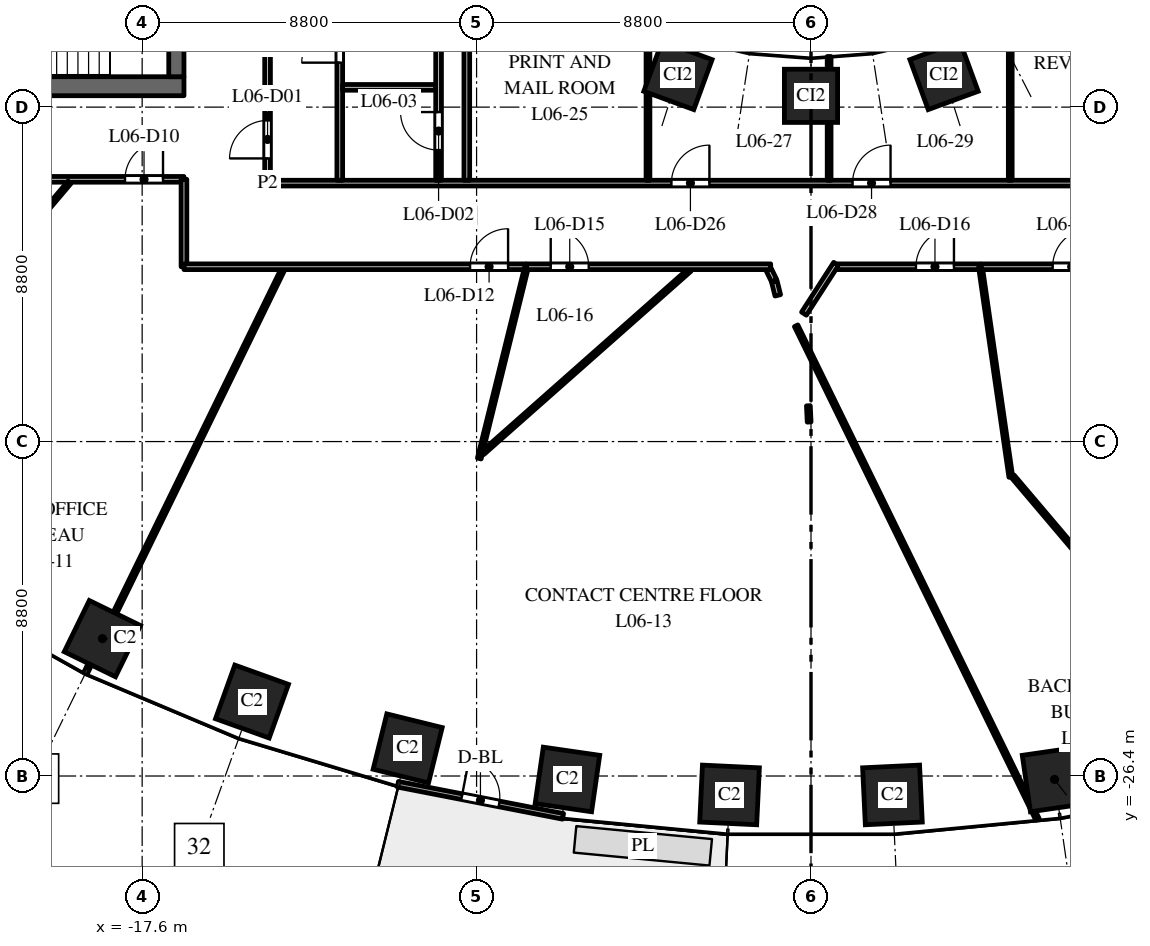
"""IFC4 building model, lengths in metres.
Left out: names, types, materials, properties, quantities, classifications, styles, units other than length and angle.
Written with IfcOpenShell. Run it as: python <this file> out.ifc"""

import sys

from ifc_helpers import new_model, si_unit, direction, frame, frame_2d, origin, origin_2d, place, context, subcontext, project, spatial, rectangle, extrude, element, fill, save


model = new_model("IFC4")
c1 = context("Model", 3, precision=1e-05, world=origin(), true_north=direction((0.0, 1.0)))
c2 = subcontext(c1, "Body", "Model", "MODEL_VIEW")
j1 = project(units=[si_unit("LENGTHUNIT", "METRE"), si_unit("PLANEANGLEUNIT", "RADIAN")], contexts=[c1])
p1 = place(None, origin())
s1 = spatial("IfcSite", under=j1, at=p1, CompositionType="ELEMENT")
p2 = place(p1, origin())
s2 = spatial("IfcBuilding", under=s1, at=p2, CompositionType="ELEMENT")
p3 = place(p2, frame((0.0, 0.0, 34.5)))
s3 = spatial("IfcBuildingStorey", under=s2, at=p3, CompositionType="ELEMENT", Elevation=34.5)
for number, where, z_axis, x_axis in (
    (1, (-18.646, -22.785, 0.0), (0.0, 0.0, 1.0), (0.898, -0.439, 0.0)),
    (2, (-14.709, -24.441, 0.0), (0.0, 0.0, 1.0), (0.941, -0.338, 0.0)),
    (3, (-10.613, -25.674, 0.0), (0.0, 0.0, 1.0), (0.971, -0.24, 0.0)),
    (4, (-6.409, -26.491, 0.0), (0.0, 0.0, 1.0), (0.99, -0.143, 0.0)),
    (5, (-2.143, -26.898, 0.0), (0.0, 0.0, 1.0), (0.999, -0.048, 0.0)),
    (6, (2.143, -26.898, 0.0), (0.0, 0.0, 1.0), (0.999, 0.048, 0.0)),
    (7, (6.409, -26.491, 0.0), (0.0, 0.0, 1.0), (0.99, 0.143, 0.0)),
):
    element("IfcColumn", number, at=place(p3, frame(where, z_axis=z_axis, x_axis=x_axis)), inside=s3, PredefinedType="COLUMN", context=c2, shape_type="SweptSolid", body=[
        extrude(rectangle(XDim=1.5, YDim=1.5, at=origin_2d()), origin(), (0.0, 0.0, 1.0), 4.0),
    ])
for number, where, z_axis, x_axis in (
    (8, (-3.501, -7.967, 0.0), (0.0, 0.0, 1.0), (0.939, -0.344, 0.0)),
    (9, (0.0, -8.503, 0.0), (0.0, 0.0, 1.0), (1.0, 0.0, 0.0)),
    (10, (3.501, -7.967, 0.0), (0.0, 0.0, 1.0), (0.939, 0.344, 0.0)),
):
    element("IfcColumn", number, at=place(p3, frame(where, z_axis=z_axis, x_axis=x_axis)), inside=s3, PredefinedType="COLUMN", context=c2, shape_type="SweptSolid", body=[
        extrude(rectangle(XDim=1.4, YDim=1.4, at=origin_2d()), origin(), (0.0, 0.0, 1.0), 4.0),
    ])
p4 = place(p3, frame((-16.5, -8.25, 0.0), z_axis=(0.0, 0.0, 1.0), x_axis=(-1.0, 0.0, 0.0)))
e11 = element("IfcWall", 11, at=p4, inside=s3, PredefinedType="SHEAR", context=c2, shape_type="SweptSolid", body=[
    extrude(rectangle(XDim=15.0, YDim=0.5, at=frame_2d((7.5, 0.0))), origin(), (0.0, 0.0, 1.0), 3.7),
])
p5 = place(p4, frame((6.9, 0.0, 0.0)))
e12 = element("IfcOpeningElement", 12, at=p5, cuts=e11, PredefinedType="OPENING", context=c2, shape_type="SweptSolid", body=[
    extrude(rectangle(XDim=1.2, YDim=2.1, at=frame_2d((0.6, 1.05))), frame((0.0, 0.26, 0.0), z_axis=(0.0, -1.0, 0.0), x_axis=(1.0, 0.0, 0.0)), (0.0, 0.0, 1.0), 0.52),
])
p6 = place(p4, frame((12.275, 0.0, 0.0)))
e13 = element("IfcOpeningElement", 13, at=p6, cuts=e11, PredefinedType="OPENING", context=c2, shape_type="SweptSolid", body=[
    extrude(rectangle(XDim=0.9, YDim=2.1, at=frame_2d((0.45, 1.05))), frame((0.0, 0.26, 0.0), z_axis=(0.0, -1.0, 0.0), x_axis=(1.0, 0.0, 0.0)), (0.0, 0.0, 1.0), 0.52),
])
p7 = place(p3, frame((-16.7, -8.0, 0.0), z_axis=(0.0, 0.0, 1.0), x_axis=(0.0, 1.0, 0.0)))
e14 = element("IfcWall", 14, at=p7, inside=s3, PredefinedType="SHEAR", context=c2, shape_type="SweptSolid", body=[
    extrude(rectangle(XDim=16.0, YDim=0.4, at=frame_2d((8.0, 0.0))), origin(), (0.0, 0.0, 1.0), 3.7),
])
p8 = place(p3, frame((-10.871, -26.617, 0.0), z_axis=(0.0, 0.0, 1.0), x_axis=(0.981631174778, -0.190788460615, 0.0)))
e15 = element("IfcWall", 15, at=p8, inside=s3, PredefinedType="STANDARD", context=c2, shape_type="SweptSolid", body=[
    extrude(rectangle(XDim=4.426, YDim=0.15, at=frame_2d((2.213, 0.0))), origin(), (0.0, 0.0, 1.0), 3.7),
])
p9 = place(p8, frame((1.713, 0.0, 0.0)))
e16 = element("IfcOpeningElement", 16, at=p9, cuts=e15, PredefinedType="OPENING", context=c2, shape_type="SweptSolid", body=[
    extrude(rectangle(XDim=1.0, YDim=2.4, at=frame_2d((0.5, 1.2))), frame((0.0, 0.085, 0.0), z_axis=(0.0, -1.0, 0.0), x_axis=(1.0, 0.0, 0.0)), (0.0, 0.0, 1.0), 0.17),
])
p10 = place(p3, frame((-31.5, -10.7, 0.0), z_axis=(0.0, 0.0, 1.0), x_axis=(1.0, 0.0, 0.0)))
e17 = element("IfcWall", 17, at=p10, inside=s3, PredefinedType="PARTITIONING", context=c2, shape_type="SweptSolid", body=[
    extrude(rectangle(XDim=15.0, YDim=0.15, at=frame_2d((7.5, 0.0))), origin(), (0.0, 0.0, 1.0), 3.1),
])
p11 = place(p10, frame((9.879, 0.0, 0.0)))
e18 = element("IfcOpeningElement", 18, at=p11, cuts=e17, PredefinedType="OPENING", context=c2, shape_type="SweptSolid", body=[
    extrude(rectangle(XDim=1.0, YDim=2.1, at=frame_2d((0.5, 1.05))), frame((0.0, 0.085, 0.0), z_axis=(0.0, -1.0, 0.0), x_axis=(1.0, 0.0, 0.0)), (0.0, 0.0, 1.0), 0.17),
])
p12 = place(p10, frame((13.449, 0.0, 0.0)))
e19 = element("IfcOpeningElement", 19, at=p12, cuts=e17, PredefinedType="OPENING", context=c2, shape_type="SweptSolid", body=[
    extrude(rectangle(XDim=1.0, YDim=2.1, at=frame_2d((0.5, 1.05))), frame((0.0, 0.085, 0.0), z_axis=(0.0, -1.0, 0.0), x_axis=(1.0, 0.0, 0.0)), (0.0, 0.0, 1.0), 0.17),
])
p13 = place(p3, frame((-26.43, -18.945, 0.0), z_axis=(0.0, 0.0, 1.0), x_axis=(0.646400187952, 0.762998556365, 0.0)))
e20 = element("IfcWall", 20, at=p13, inside=s3, PredefinedType="PARTITIONING", context=c2, shape_type="SweptSolid", body=[
    extrude(rectangle(XDim=10.704, YDim=0.1, at=frame_2d((5.352, 0.0))), origin(), (0.0, 0.0, 1.0), 3.7),
])
p14 = place(p3, frame((-19.086, -23.685, 0.0), z_axis=(0.0, 0.0, 1.0), x_axis=(0.439199750603, 0.898389436197, 0.0)))
e21 = element("IfcWall", 21, at=p14, inside=s3, PredefinedType="PARTITIONING", context=c2, shape_type="SweptSolid", body=[
    extrude(rectangle(XDim=11.81, YDim=0.1, at=frame_2d((5.905, 0.0))), origin(), (0.0, 0.0, 1.0), 3.7),
])
p15 = place(p3, frame((-16.5, -13.0, 0.0), z_axis=(0.0, 0.0, 1.0), x_axis=(0.0, 1.0, 0.0)))
e22 = element("IfcWall", 22, at=p15, inside=s3, PredefinedType="PARTITIONING", context=c2, shape_type="SweptSolid", body=[
    extrude(rectangle(XDim=2.3, YDim=0.15, at=frame_2d((1.15, 0.0))), origin(), (0.0, 0.0, 1.0), 2.75),
])
p16 = place(p3, frame((-16.5, -13.0, 0.0), z_axis=(0.0, 0.0, 1.0), x_axis=(1.0, 0.0, 0.0)))
e23 = element("IfcWall", 23, at=p16, inside=s3, PredefinedType="PARTITIONING", context=c2, shape_type="SweptSolid", body=[
    extrude(rectangle(XDim=9.001, YDim=0.15, at=frame_2d((4.5, 0.0))), origin(), (0.0, 0.0, 1.0), 2.85),
])
p17 = place(p16, frame((7.529, 0.0, 0.0)))
e24 = element("IfcOpeningElement", 24, at=p17, cuts=e23, PredefinedType="OPENING", context=c2, shape_type="SweptSolid", body=[
    extrude(rectangle(XDim=1.0, YDim=2.1, at=frame_2d((0.5, 1.05))), frame((0.0, 0.085, 0.0), z_axis=(0.0, -1.0, 0.0), x_axis=(1.0, 0.0, 0.0)), (0.0, 0.0, 1.0), 0.17),
])
p18 = place(p3, frame((-14.3, -10.8, 0.0), z_axis=(0.0, 0.0, 1.0), x_axis=(0.0, 1.0, 0.0)))
e25 = element("IfcWall", 25, at=p18, inside=s3, PredefinedType="PARTITIONING", context=c2, shape_type="SweptSolid", body=[
    extrude(rectangle(XDim=21.6, YDim=0.15, at=frame_2d((10.8, 0.0))), origin(), (0.0, 0.0, 1.0), 2.75),
])
p19 = place(p18, frame((0.65, 0.0, 0.0)))
e26 = element("IfcOpeningElement", 26, at=p19, cuts=e25, PredefinedType="OPENING", context=c2, shape_type="SweptSolid", body=[
    extrude(rectangle(XDim=1.0, YDim=2.1, at=frame_2d((0.5, 1.05))), frame((0.0, 0.085, 0.0), z_axis=(0.0, -1.0, 0.0), x_axis=(1.0, 0.0, 0.0)), (0.0, 0.0, 1.0), 0.17),
])
p20 = place(p3, frame((-14.3, -10.8, 0.0), z_axis=(0.0, 0.0, 1.0), x_axis=(1.0, 0.0, 0.0)))
e27 = element("IfcWall", 27, at=p20, inside=s3, PredefinedType="PARTITIONING", context=c2, shape_type="SweptSolid", body=[
    extrude(rectangle(XDim=28.6, YDim=0.15, at=frame_2d((14.3, 0.0))), origin(), (0.0, 0.0, 1.0), 2.85),
])
p21 = place(p20, frame((10.627, 0.0, 0.0)))
e28 = element("IfcOpeningElement", 28, at=p21, cuts=e27, PredefinedType="OPENING", context=c2, shape_type="SweptSolid", body=[
    extrude(rectangle(XDim=1.0, YDim=2.1, at=frame_2d((0.5, 1.05))), frame((0.0, 0.085, 0.0), z_axis=(0.0, -1.0, 0.0), x_axis=(1.0, 0.0, 0.0)), (0.0, 0.0, 1.0), 0.17),
])
p22 = place(p20, frame((15.393, 0.0, 0.0)))
e29 = element("IfcOpeningElement", 29, at=p22, cuts=e27, PredefinedType="OPENING", context=c2, shape_type="SweptSolid", body=[
    extrude(rectangle(XDim=1.0, YDim=2.1, at=frame_2d((0.5, 1.05))), frame((0.0, 0.085, 0.0), z_axis=(0.0, -1.0, 0.0), x_axis=(1.0, 0.0, 0.0)), (0.0, 0.0, 1.0), 0.17),
])
p23 = place(p3, frame((-12.4, -10.725, 0.0), z_axis=(0.0, 0.0, 1.0), x_axis=(0.0, 1.0, 0.0)))
e30 = element("IfcWall", 30, at=p23, inside=s3, PredefinedType="PARTITIONING", context=c2, shape_type="SweptSolid", body=[
    extrude(rectangle(XDim=7.065, YDim=0.15, at=frame_2d((3.533, 0.0))), origin(), (0.0, 0.0, 1.0), 2.75),
])
p24 = place(p23, frame((3.095, 0.0, 0.0)))
e31 = element("IfcOpeningElement", 31, at=p24, cuts=e30, PredefinedType="OPENING", context=c2, shape_type="SweptSolid", body=[
    extrude(rectangle(XDim=1.0, YDim=2.1, at=frame_2d((0.5, 1.05))), frame((0.0, 0.085, 0.0), z_axis=(0.0, -1.0, 0.0), x_axis=(1.0, 0.0, 0.0)), (0.0, 0.0, 1.0), 0.17),
])
p25 = place(p23, frame((5.447, 0.0, 0.0)))
e32 = element("IfcOpeningElement", 32, at=p25, cuts=e30, PredefinedType="OPENING", context=c2, shape_type="SweptSolid", body=[
    extrude(rectangle(XDim=1.0, YDim=2.1, at=frame_2d((0.5, 1.05))), frame((0.0, 0.085, 0.0), z_axis=(0.0, -1.0, 0.0), x_axis=(1.0, 0.0, 0.0)), (0.0, 0.0, 1.0), 0.17),
])
p26 = place(p3, frame((-12.325, -8.28, 0.0), z_axis=(0.0, 0.0, 1.0), x_axis=(1.0, 0.0, 0.0)))
e33 = element("IfcWall", 33, at=p26, inside=s3, PredefinedType="PARTITIONING", context=c2, shape_type="SweptSolid", body=[
    extrude(rectangle(XDim=2.45, YDim=0.15, at=frame_2d((1.225, 0.0))), origin(), (0.0, 0.0, 1.0), 2.75),
])
p27 = place(p3, frame((-9.8, -10.725, 0.0), z_axis=(0.0, 0.0, 1.0), x_axis=(0.0, 1.0, 0.0)))
e34 = element("IfcWall", 34, at=p27, inside=s3, PredefinedType="PARTITIONING", context=c2, shape_type="SweptSolid", body=[
    extrude(rectangle(XDim=7.065, YDim=0.15, at=frame_2d((3.533, 0.0))), origin(), (0.0, 0.0, 1.0), 2.75),
])
p28 = place(p27, frame((0.795, 0.0, 0.0)))
e35 = element("IfcOpeningElement", 35, at=p28, cuts=e34, PredefinedType="OPENING", context=c2, shape_type="SweptSolid", body=[
    extrude(rectangle(XDim=1.0, YDim=2.1, at=frame_2d((0.5, 1.05))), frame((0.0, 0.085, 0.0), z_axis=(0.0, -1.0, 0.0), x_axis=(1.0, 0.0, 0.0)), (0.0, 0.0, 1.0), 0.17),
])
p29 = place(p3, frame((-9.057, -10.725, 0.0), z_axis=(0.0, 0.0, 1.0), x_axis=(0.0, 1.0, 0.0)))
e36 = element("IfcWall", 36, at=p29, inside=s3, PredefinedType="PARTITIONING", context=c2, shape_type="SweptSolid", body=[
    extrude(rectangle(XDim=10.68, YDim=0.15, at=frame_2d((5.34, 0.0))), origin(), (0.0, 0.0, 1.0), 2.75),
])
p30 = place(p29, frame((5.075, 0.0, 0.0)))
e37 = element("IfcOpeningElement", 37, at=p30, cuts=e36, PredefinedType="OPENING", context=c2, shape_type="SweptSolid", body=[
    extrude(rectangle(XDim=1.0, YDim=2.1, at=frame_2d((0.5, 1.05))), frame((0.0, 0.085, 0.0), z_axis=(0.0, -1.0, 0.0), x_axis=(1.0, 0.0, 0.0)), (0.0, 0.0, 1.0), 0.17),
])
p31 = place(p3, frame((-8.729, -18.046, 0.0), z_axis=(0.0, 0.0, 1.0), x_axis=(0.239749411988, 0.970834805439, 0.0)))
e38 = element("IfcWall", 38, at=p31, inside=s3, PredefinedType="PARTITIONING", context=c2, shape_type="SweptSolid", body=[
    extrude(rectangle(XDim=5.198, YDim=0.1, at=frame_2d((2.599, 0.0))), origin(), (0.0, 0.0, 1.0), 3.7),
])
p32 = place(p3, frame((-8.642, -17.903, 0.0), z_axis=(0.0, 0.0, 1.0), x_axis=(0.749027274438, 0.662539162728, 0.0)))
e39 = element("IfcWall", 39, at=p32, inside=s3, PredefinedType="PARTITIONING", context=c2, shape_type="SweptSolid", body=[
    extrude(rectangle(XDim=7.283, YDim=0.1, at=frame_2d((3.642, 0.0))), origin(), (0.0, 0.0, 1.0), 2.85),
])
p33 = place(p3, frame((-7.483, -13.0, 0.0), z_axis=(0.0, 0.0, 1.0), x_axis=(1.0, 0.0, 0.0)))
e40 = element("IfcWall", 40, at=p33, inside=s3, PredefinedType="PARTITIONING", context=c2, shape_type="SweptSolid", body=[
    extrude(rectangle(XDim=6.422, YDim=0.15, at=frame_2d((3.211, 0.0))), origin(), (0.0, 0.0, 1.0), 2.85),
])
p34 = place(p33, frame((0.634, 0.0, 0.0)))
e41 = element("IfcOpeningElement", 41, at=p34, cuts=e40, PredefinedType="OPENING", context=c2, shape_type="SweptSolid", body=[
    extrude(rectangle(XDim=1.0, YDim=2.1, at=frame_2d((0.5, 1.05))), frame((0.0, 0.085, 0.0), z_axis=(0.0, -1.0, 0.0), x_axis=(1.0, 0.0, 0.0)), (0.0, 0.0, 1.0), 0.17),
])
p35 = place(p3, frame((-4.29, -10.725, 0.0), z_axis=(0.0, 0.0, 1.0), x_axis=(0.0, 1.0, 0.0)))
e42 = element("IfcWall", 42, at=p35, inside=s3, PredefinedType="PARTITIONING", context=c2, shape_type="SweptSolid", body=[
    extrude(rectangle(XDim=4.157, YDim=0.1, at=frame_2d((2.079, 0.0))), origin(), (0.0, 0.0, 1.0), 2.85),
])
p36 = place(p3, frame((-1.111, -13.079, 0.0), z_axis=(0.0, 0.0, 1.0), x_axis=(0.440240923942, -0.897879685084, 0.0)))
e43 = element("IfcWall", 43, at=p36, inside=s3, PredefinedType="PARTITIONING", context=c2, shape_type="SweptSolid", body=[
    extrude(rectangle(XDim=0.323, YDim=0.15, at=frame_2d((0.161, 0.0))), origin(), (0.0, 0.0, 1.0), 2.85),
])
p37 = place(p3, frame((-0.965, -13.386, 0.0), z_axis=(0.0, 0.0, 1.0), x_axis=(0.240863917947, -0.97055889725, 0.0)))
e44 = element("IfcWall", 44, at=p37, inside=s3, PredefinedType="PARTITIONING", context=c2, shape_type="SweptSolid", body=[
    extrude(rectangle(XDim=0.378, YDim=0.15, at=frame_2d((0.189, 0.0))), origin(), (0.0, 0.0, 1.0), 2.85),
])
p38 = place(p3, frame((-0.391, -14.553, 0.0), z_axis=(0.0, 0.0, 1.0), x_axis=(0.439257390119, -0.898361255412, 0.0)))
e45 = element("IfcWall", 45, at=p38, inside=s3, PredefinedType="PARTITIONING", context=c2, shape_type="SweptSolid", body=[
    extrude(rectangle(XDim=14.454, YDim=0.1, at=frame_2d((7.227, 0.0))), origin(), (0.0, 0.0, 1.0), 2.85),
])
p39 = place(p3, frame((-0.185, -14.234, 0.0), z_axis=(0.0, 0.0, 1.0), x_axis=(0.542380278774, 0.840133104452, 0.0)))
e46 = element("IfcWall", 46, at=p39, inside=s3, PredefinedType="PARTITIONING", context=c2, shape_type="SweptSolid", body=[
    extrude(rectangle(XDim=1.558, YDim=0.15, at=frame_2d((0.779, 0.0))), origin(), (0.0, 0.0, 1.0), 3.7),
])
p40 = place(p3, frame((-0.069, -16.658, 0.0), z_axis=(0.0, 0.0, 1.0), x_axis=(0.046725861685, -0.99890775042, 0.0)))
e47 = element("IfcWall", 47, at=p40, inside=s3, PredefinedType="PARTITIONING", context=c2, shape_type="SweptSolid", body=[
    extrude(rectangle(XDim=0.428, YDim=0.1, at=frame_2d((0.214, 0.0))), origin(), (0.0, 0.0, 1.0), 3.7),
])
p41 = place(p3, frame((0.477, -10.725, 0.0), z_axis=(0.0, 0.0, 1.0), x_axis=(0.0, 1.0, 0.0)))
e48 = element("IfcWall", 48, at=p41, inside=s3, PredefinedType="PARTITIONING", context=c2, shape_type="SweptSolid", body=[
    extrude(rectangle(XDim=3.257, YDim=0.1, at=frame_2d((1.628, 0.0))), origin(), (0.0, 0.0, 1.0), 2.85),
])
p42 = place(p3, frame((0.701, -13.0, 0.0), z_axis=(0.0, 0.0, 1.0), x_axis=(1.0, 0.0, 0.0)))
e49 = element("IfcWall", 49, at=p42, inside=s3, PredefinedType="PARTITIONING", context=c2, shape_type="SweptSolid", body=[
    extrude(rectangle(XDim=3.758, YDim=0.15, at=frame_2d((1.879, 0.0))), origin(), (0.0, 0.0, 1.0), 2.85),
])
p43 = place(p42, frame((2.061, 0.0, 0.0)))
e50 = element("IfcOpeningElement", 50, at=p43, cuts=e49, PredefinedType="OPENING", context=c2, shape_type="SweptSolid", body=[
    extrude(rectangle(XDim=1.0, YDim=2.1, at=frame_2d((0.5, 1.05))), frame((0.0, 0.085, 0.0), z_axis=(0.0, -1.0, 0.0), x_axis=(1.0, 0.0, 0.0)), (0.0, 0.0, 1.0), 0.17),
])
p44 = place(p3, frame((4.459, -13.004, 0.0), z_axis=(0.0, 0.0, 1.0), x_axis=(0.143036391033, -0.989717429795, 0.0)))
e51 = element("IfcWall", 51, at=p44, inside=s3, PredefinedType="PARTITIONING", context=c2, shape_type="SweptSolid", body=[
    extrude(rectangle(XDim=5.586, YDim=0.1, at=frame_2d((2.793, 0.0))), origin(), (0.0, 0.0, 1.0), 3.7),
])
p45 = place(p3, frame((4.479, -13.0, 0.0), z_axis=(0.0, 0.0, 1.0), x_axis=(1.0, 0.0, 0.0)))
e52 = element("IfcWall", 52, at=p45, inside=s3, PredefinedType="PARTITIONING", context=c2, shape_type="SweptSolid", body=[
    extrude(rectangle(XDim=3.568, YDim=0.15, at=frame_2d((1.784, 0.0))), origin(), (0.0, 0.0, 1.0), 2.85),
])
p46 = place(p45, frame((1.88, 0.0, 0.0)))
e53 = element("IfcOpeningElement", 53, at=p46, cuts=e52, PredefinedType="OPENING", context=c2, shape_type="SweptSolid", body=[
    extrude(rectangle(XDim=1.0, YDim=2.1, at=frame_2d((0.5, 1.05))), frame((0.0, 0.085, 0.0), z_axis=(0.0, -1.0, 0.0), x_axis=(1.0, 0.0, 0.0)), (0.0, 0.0, 1.0), 0.17),
])
p47 = place(p3, frame((5.243, -10.725, 0.0), z_axis=(0.0, 0.0, 1.0), x_axis=(0.0, 1.0, 0.0)))
e54 = element("IfcWall", 54, at=p47, inside=s3, PredefinedType="PARTITIONING", context=c2, shape_type="SweptSolid", body=[
    extrude(rectangle(XDim=4.666, YDim=0.1, at=frame_2d((2.333, 0.0))), origin(), (0.0, 0.0, 1.0), 2.85),
])
p48 = place(p3, frame((5.306, -18.512, 0.0), z_axis=(0.0, 0.0, 1.0), x_axis=(0.646500054355, -0.762913939917, 0.0)))
e55 = element("IfcWall", 55, at=p48, inside=s3, PredefinedType="PARTITIONING", context=c2, shape_type="SweptSolid", body=[
    extrude(rectangle(XDim=10.239, YDim=0.1, at=frame_2d((5.119, 0.0))), origin(), (0.0, 0.0, 1.0), 2.85),
])
p49 = place(p9, origin())
e56 = element("IfcDoor", 56, at=p49, inside=s3, OperationType="SINGLE_SWING_LEFT", PredefinedType="DOOR", context=c2, shape_type="SweptSolid", body=[
    extrude(rectangle(XDim=1.0, YDim=2.4, at=frame_2d((0.5, 1.2))), frame((0.0, 0.025, 0.0), z_axis=(0.0, -1.0, 0.0), x_axis=(1.0, 0.0, 0.0)), (0.0, 0.0, 1.0), 0.05),
])
fill(e16, e56)
p50 = place(p19, origin())
e57 = element("IfcDoor", 57, at=p50, inside=s3, OperationType="SINGLE_SWING_LEFT", PredefinedType="DOOR", context=c2, shape_type="SweptSolid", body=[
    extrude(rectangle(XDim=1.0, YDim=2.1, at=frame_2d((0.5, 1.05))), frame((0.0, 0.025, 0.0), z_axis=(0.0, -1.0, 0.0), x_axis=(1.0, 0.0, 0.0)), (0.0, 0.0, 1.0), 0.05),
])
fill(e26, e57)
p51 = place(p28, origin())
e58 = element("IfcDoor", 58, at=p51, inside=s3, OperationType="SINGLE_SWING_RIGHT", PredefinedType="DOOR", context=c2, shape_type="SweptSolid", body=[
    extrude(rectangle(XDim=1.0, YDim=2.1, at=frame_2d((0.5, 1.05))), frame((0.0, 0.025, 0.0), z_axis=(0.0, -1.0, 0.0), x_axis=(1.0, 0.0, 0.0)), (0.0, 0.0, 1.0), 0.05),
])
fill(e35, e58)
p52 = place(p24, origin())
e59 = element("IfcDoor", 59, at=p52, inside=s3, OperationType="SINGLE_SWING_LEFT", PredefinedType="DOOR", context=c2, shape_type="SweptSolid", body=[
    extrude(rectangle(XDim=1.0, YDim=2.1, at=frame_2d((0.5, 1.05))), frame((0.0, 0.025, 0.0), z_axis=(0.0, -1.0, 0.0), x_axis=(1.0, 0.0, 0.0)), (0.0, 0.0, 1.0), 0.05),
])
fill(e31, e59)
p53 = place(p12, origin())
e60 = element("IfcDoor", 60, at=p53, inside=s3, OperationType="SINGLE_SWING_RIGHT", PredefinedType="DOOR", context=c2, shape_type="SweptSolid", body=[
    extrude(rectangle(XDim=1.0, YDim=2.1, at=frame_2d((0.5, 1.05))), frame((0.0, 0.025, 0.0), z_axis=(0.0, -1.0, 0.0), x_axis=(1.0, 0.0, 0.0)), (0.0, 0.0, 1.0), 0.05),
])
fill(e19, e60)
p54 = place(p17, origin())
e61 = element("IfcDoor", 61, at=p54, inside=s3, OperationType="SINGLE_SWING_RIGHT", PredefinedType="DOOR", context=c2, shape_type="SweptSolid", body=[
    extrude(rectangle(XDim=1.0, YDim=2.1, at=frame_2d((0.5, 1.05))), frame((0.0, 0.025, 0.0), z_axis=(0.0, -1.0, 0.0), x_axis=(1.0, 0.0, 0.0)), (0.0, 0.0, 1.0), 0.05),
])
fill(e24, e61)
p55 = place(p34, origin())
e62 = element("IfcDoor", 62, at=p55, inside=s3, OperationType="SINGLE_SWING_LEFT", PredefinedType="DOOR", context=c2, shape_type="SweptSolid", body=[
    extrude(rectangle(XDim=1.0, YDim=2.1, at=frame_2d((0.5, 1.05))), frame((0.0, 0.025, 0.0), z_axis=(0.0, -1.0, 0.0), x_axis=(1.0, 0.0, 0.0)), (0.0, 0.0, 1.0), 0.05),
])
fill(e41, e62)
p56 = place(p43, origin())
e63 = element("IfcDoor", 63, at=p56, inside=s3, OperationType="SINGLE_SWING_RIGHT", PredefinedType="DOOR", context=c2, shape_type="SweptSolid", body=[
    extrude(rectangle(XDim=1.0, YDim=2.1, at=frame_2d((0.5, 1.05))), frame((0.0, 0.025, 0.0), z_axis=(0.0, -1.0, 0.0), x_axis=(1.0, 0.0, 0.0)), (0.0, 0.0, 1.0), 0.05),
])
fill(e50, e63)
p57 = place(p46, origin())
e64 = element("IfcDoor", 64, at=p57, inside=s3, OperationType="SINGLE_SWING_RIGHT", PredefinedType="DOOR", context=c2, shape_type="SweptSolid", body=[
    extrude(rectangle(XDim=1.0, YDim=2.1, at=frame_2d((0.5, 1.05))), frame((0.0, 0.025, 0.0), z_axis=(0.0, -1.0, 0.0), x_axis=(1.0, 0.0, 0.0)), (0.0, 0.0, 1.0), 0.05),
])
fill(e53, e64)
p58 = place(p21, origin())
e65 = element("IfcDoor", 65, at=p58, inside=s3, OperationType="SINGLE_SWING_RIGHT", PredefinedType="DOOR", context=c2, shape_type="SweptSolid", body=[
    extrude(rectangle(XDim=1.0, YDim=2.1, at=frame_2d((0.5, 1.05))), frame((0.0, 0.025, 0.0), z_axis=(0.0, -1.0, 0.0), x_axis=(1.0, 0.0, 0.0)), (0.0, 0.0, 1.0), 0.05),
])
fill(e28, e65)
p59 = place(p22, origin())
e66 = element("IfcDoor", 66, at=p59, inside=s3, OperationType="SINGLE_SWING_RIGHT", PredefinedType="DOOR", context=c2, shape_type="SweptSolid", body=[
    extrude(rectangle(XDim=1.0, YDim=2.1, at=frame_2d((0.5, 1.05))), frame((0.0, 0.025, 0.0), z_axis=(0.0, -1.0, 0.0), x_axis=(1.0, 0.0, 0.0)), (0.0, 0.0, 1.0), 0.05),
])
fill(e29, e66)
save(model, sys.argv[1])
